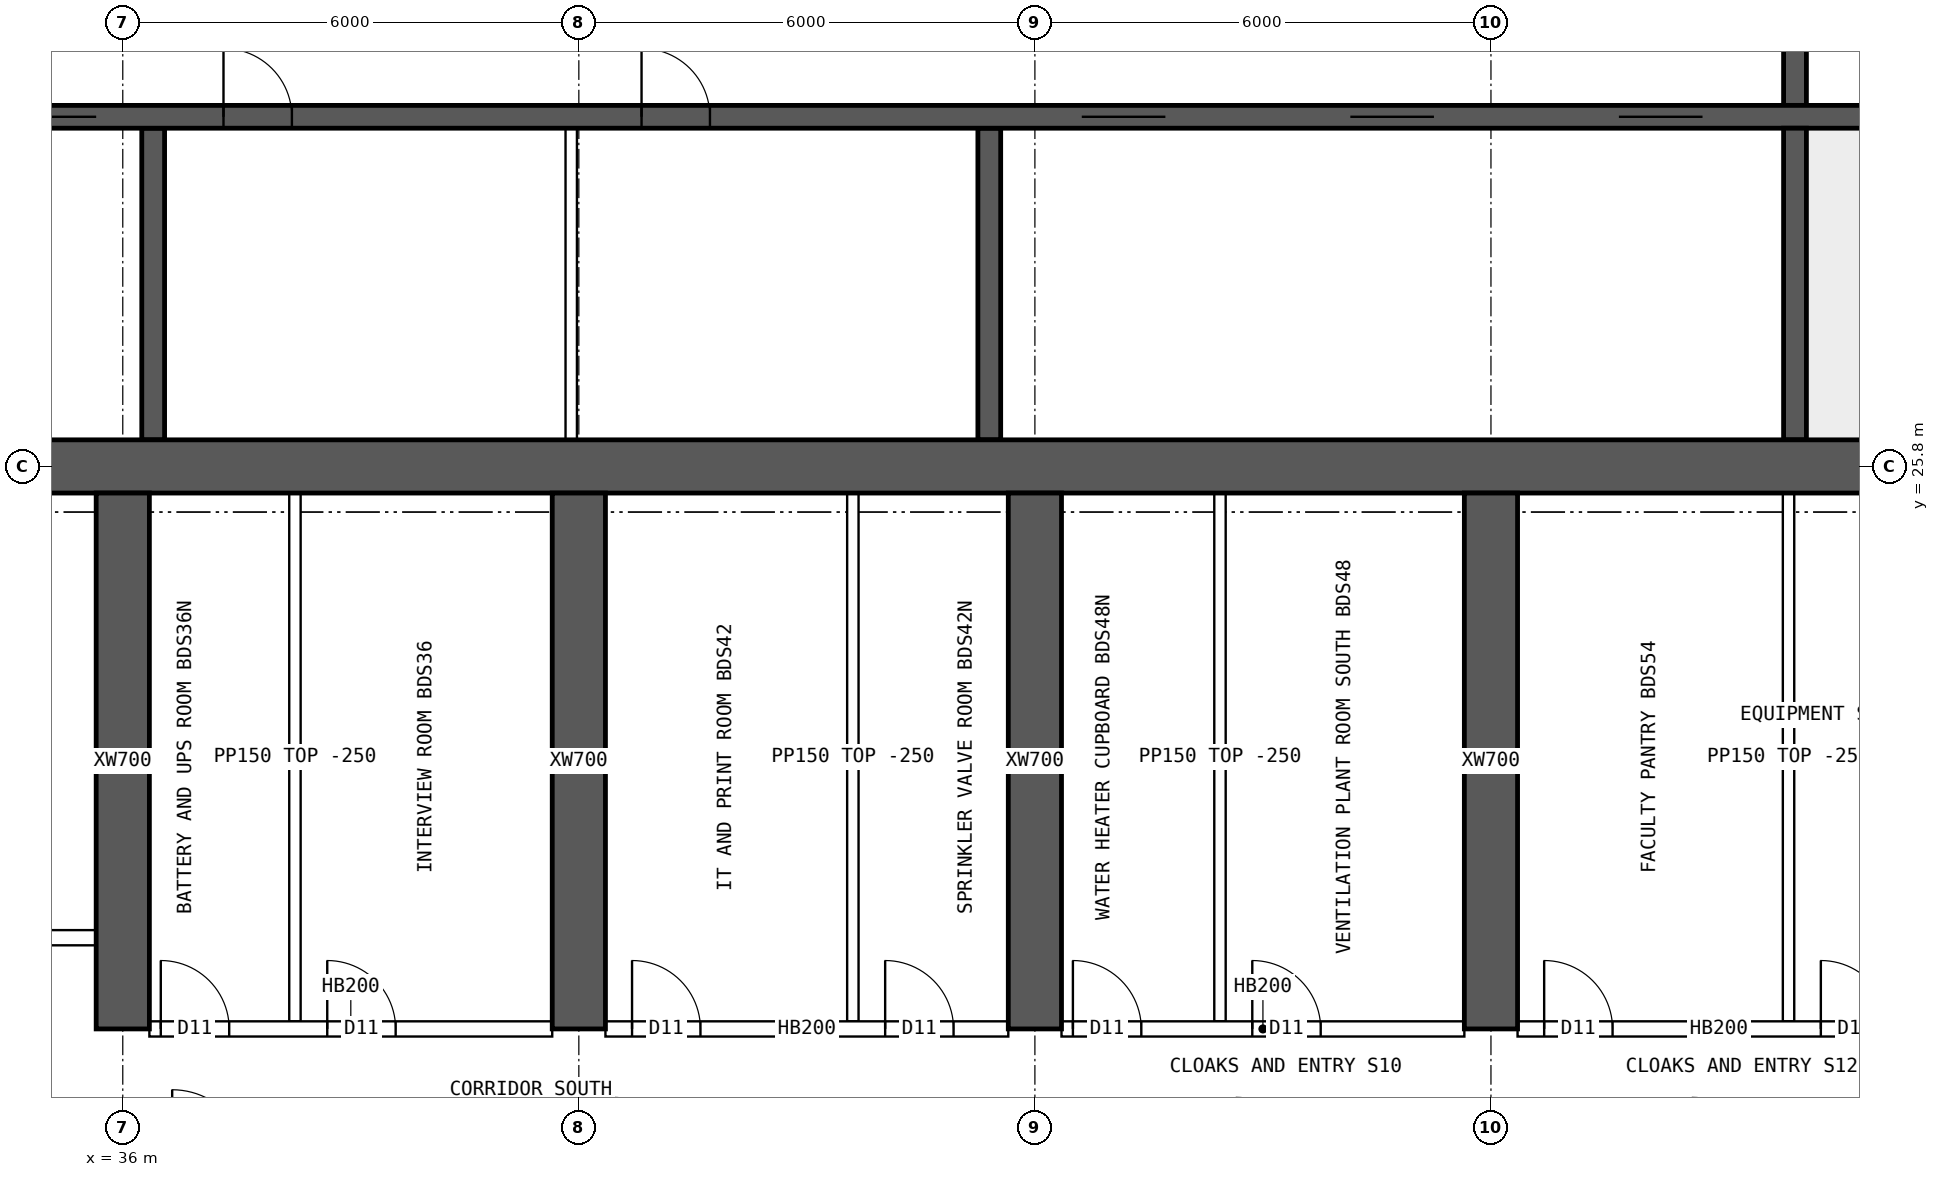
"""IFC4 building model, lengths in metres.
Left out: names, types, materials, properties, quantities, classifications, styles, units other than length and angle.
Written with IfcOpenShell. Run it as: python <this file> out.ifc"""

import sys

from ifc_helpers import new_model, si_unit, direction, frame, frame_2d, origin, place, context, subcontext, project, spatial, rectangle, extrude, element, fill, save


model = new_model("IFC4")
c1 = context("Model", 3, precision=1e-05, world=origin(), true_north=direction((0.0, 1.0)))
c2 = subcontext(c1, "Body", "Model", "MODEL_VIEW")
j1 = project(units=[si_unit("LENGTHUNIT", "METRE"), si_unit("PLANEANGLEUNIT", "RADIAN")], contexts=[c1])
p1 = place(None, origin())
s1 = spatial("IfcSite", under=j1, at=p1, CompositionType="ELEMENT")
p2 = place(p1, origin())
s2 = spatial("IfcBuilding", under=s1, at=p2, CompositionType="ELEMENT")
p3 = place(p2, frame((0.0, 0.0, 250.3)))
s3 = spatial("IfcBuildingStorey", under=s2, at=p3, CompositionType="ELEMENT", Elevation=250.3)
p4 = place(p3, frame((18.0, 25.8, 0.0), z_axis=(0.0, 0.0, 1.0), x_axis=(1.0, 0.0, 0.0)))
e1 = element("IfcWall", 1, at=p4, inside=s3, PredefinedType="SHEAR", context=c2, shape_type="SweptSolid", body=[
    extrude(rectangle(XDim=48.0, YDim=0.7, at=frame_2d((24.0, 0.0))), origin(), (0.0, 0.0, 1.0), 3.75),
])
p5 = place(p3, frame((18.35, 30.4, 0.0), z_axis=(0.0, 0.0, 1.0), x_axis=(1.0, 0.0, 0.0)))
e2 = element("IfcWall", 2, at=p5, inside=s3, PredefinedType="SHEAR", context=c2, shape_type="SweptSolid", body=[
    extrude(rectangle(XDim=47.3, YDim=0.3, at=frame_2d((23.65, 0.0))), origin(), (0.0, 0.0, 1.0), 3.75),
])
p6 = place(p5, frame((0.4, 0.0, 0.0)))
e3 = element("IfcOpeningElement", 3, at=p6, cuts=e2, PredefinedType="OPENING", context=c2, shape_type="SweptSolid", body=[
    extrude(rectangle(XDim=1.0, YDim=2.1, at=frame_2d((0.5, 1.05))), frame((0.0, 0.16, 0.0), z_axis=(0.0, -1.0, 0.0), x_axis=(1.0, 0.0, 0.0)), (0.0, 0.0, 1.0), 0.32),
])
p7 = place(p5, frame((45.9, 0.0, 0.0)))
e4 = element("IfcOpeningElement", 4, at=p7, cuts=e2, PredefinedType="OPENING", context=c2, shape_type="SweptSolid", body=[
    extrude(rectangle(XDim=1.0, YDim=2.1, at=frame_2d((0.5, 1.05))), frame((0.0, 0.16, 0.0), z_axis=(0.0, -1.0, 0.0), x_axis=(1.0, 0.0, 0.0)), (0.0, 0.0, 1.0), 0.32),
])
p8 = place(p5, frame((8.4, 0.0, 0.0)))
e5 = element("IfcOpeningElement", 5, at=p8, cuts=e2, PredefinedType="OPENING", context=c2, shape_type="SweptSolid", body=[
    extrude(rectangle(XDim=1.1, YDim=2.1, at=frame_2d((0.55, 1.05))), frame((0.0, 0.16, 0.0), z_axis=(0.0, -1.0, 0.0), x_axis=(1.0, 0.0, 0.0)), (0.0, 0.0, 1.0), 0.32),
])
p9 = place(p5, frame((11.0, 0.0, 0.0)))
e6 = element("IfcOpeningElement", 6, at=p9, cuts=e2, PredefinedType="OPENING", context=c2, shape_type="SweptSolid", body=[
    extrude(rectangle(XDim=1.1, YDim=2.1, at=frame_2d((0.55, 1.05))), frame((0.0, 0.16, 0.0), z_axis=(0.0, -1.0, 0.0), x_axis=(1.0, 0.0, 0.0)), (0.0, 0.0, 1.0), 0.32),
])
p10 = place(p5, frame((13.6, 0.0, 0.0)))
e7 = element("IfcOpeningElement", 7, at=p10, cuts=e2, PredefinedType="OPENING", context=c2, shape_type="SweptSolid", body=[
    extrude(rectangle(XDim=1.1, YDim=2.1, at=frame_2d((0.55, 1.05))), frame((0.0, 0.16, 0.0), z_axis=(0.0, -1.0, 0.0), x_axis=(1.0, 0.0, 0.0)), (0.0, 0.0, 1.0), 0.32),
])
p11 = place(p5, frame((16.2, 0.0, 0.0)))
e8 = element("IfcOpeningElement", 8, at=p11, cuts=e2, PredefinedType="OPENING", context=c2, shape_type="SweptSolid", body=[
    extrude(rectangle(XDim=1.1, YDim=2.1, at=frame_2d((0.55, 1.05))), frame((0.0, 0.16, 0.0), z_axis=(0.0, -1.0, 0.0), x_axis=(1.0, 0.0, 0.0)), (0.0, 0.0, 1.0), 0.32),
])
p12 = place(p5, frame((18.975, 0.0, 0.0)))
e9 = element("IfcOpeningElement", 9, at=p12, cuts=e2, PredefinedType="OPENING", context=c2, shape_type="SweptSolid", body=[
    extrude(rectangle(XDim=0.9, YDim=2.1, at=frame_2d((0.45, 1.05))), frame((0.0, 0.16, 0.0), z_axis=(0.0, -1.0, 0.0), x_axis=(1.0, 0.0, 0.0)), (0.0, 0.0, 1.0), 0.32),
])
p13 = place(p5, frame((24.475, 0.0, 0.0)))
e10 = element("IfcOpeningElement", 10, at=p13, cuts=e2, PredefinedType="OPENING", context=c2, shape_type="SweptSolid", body=[
    extrude(rectangle(XDim=0.9, YDim=2.1, at=frame_2d((0.45, 1.05))), frame((0.0, 0.16, 0.0), z_axis=(0.0, -1.0, 0.0), x_axis=(1.0, 0.0, 0.0)), (0.0, 0.0, 1.0), 0.32),
])
p14 = place(p5, frame((30.267, 0.0, 0.0)))
e11 = element("IfcOpeningElement", 11, at=p14, cuts=e2, PredefinedType="OPENING", context=c2, shape_type="SweptSolid", body=[
    extrude(rectangle(XDim=1.1, YDim=2.1, at=frame_2d((0.55, 1.05))), frame((0.0, 0.16, 0.0), z_axis=(0.0, -1.0, 0.0), x_axis=(1.0, 0.0, 0.0)), (0.0, 0.0, 1.0), 0.32),
])
p15 = place(p5, frame((33.8, 0.0, 0.0)))
e12 = element("IfcOpeningElement", 12, at=p15, cuts=e2, PredefinedType="OPENING", context=c2, shape_type="SweptSolid", body=[
    extrude(rectangle(XDim=1.1, YDim=2.1, at=frame_2d((0.55, 1.05))), frame((0.0, 0.16, 0.0), z_axis=(0.0, -1.0, 0.0), x_axis=(1.0, 0.0, 0.0)), (0.0, 0.0, 1.0), 0.32),
])
p16 = place(p5, frame((37.333, 0.0, 0.0)))
e13 = element("IfcOpeningElement", 13, at=p16, cuts=e2, PredefinedType="OPENING", context=c2, shape_type="SweptSolid", body=[
    extrude(rectangle(XDim=1.1, YDim=2.1, at=frame_2d((0.55, 1.05))), frame((0.0, 0.16, 0.0), z_axis=(0.0, -1.0, 0.0), x_axis=(1.0, 0.0, 0.0)), (0.0, 0.0, 1.0), 0.32),
])
p17 = place(p3, frame((58.0, 26.15, 0.0), z_axis=(0.0, 0.0, 1.0), x_axis=(0.0, 1.0, 0.0)))
e14 = element("IfcWall", 14, at=p17, inside=s3, PredefinedType="SHEAR", context=c2, shape_type="SweptSolid", body=[
    extrude(rectangle(XDim=4.1, YDim=0.3, at=frame_2d((2.05, 0.0))), origin(), (0.0, 0.0, 1.0), 3.75),
])
p18 = place(p3, frame((58.0, 30.55, 0.0), z_axis=(0.0, 0.0, 1.0), x_axis=(0.0, 1.0, 0.0)))
e15 = element("IfcWall", 15, at=p18, inside=s3, PredefinedType="SHEAR", context=c2, shape_type="SweptSolid", body=[
    extrude(rectangle(XDim=3.9, YDim=0.3, at=frame_2d((1.95, 0.0))), origin(), (0.0, 0.0, 1.0), 3.75),
])
p19 = place(p18, frame((1.4, 0.0, 0.0)))
e16 = element("IfcOpeningElement", 16, at=p19, cuts=e15, PredefinedType="OPENING", context=c2, shape_type="SweptSolid", body=[
    extrude(rectangle(XDim=1.2, YDim=2.1, at=frame_2d((0.6, 1.05))), frame((0.0, 0.16, 0.0), z_axis=(0.0, -1.0, 0.0), x_axis=(1.0, 0.0, 0.0)), (0.0, 0.0, 1.0), 0.32),
])
for number, where, z_axis, x_axis in (
    (17, (36.4, 26.15, 0.0), (0.0, 0.0, 1.0), (0.0, 1.0, 0.0)),
    (18, (47.4, 26.15, 0.0), (0.0, 0.0, 1.0), (0.0, 1.0, 0.0)),
):
    element("IfcWall", number, at=place(p3, frame(where, z_axis=z_axis, x_axis=x_axis)), inside=s3, PredefinedType="SHEAR", context=c2, shape_type="SweptSolid", body=[
        extrude(rectangle(XDim=4.1, YDim=0.3, at=frame_2d((2.05, 0.0))), origin(), (0.0, 0.0, 1.0), 3.75),
    ])
for number, where, z_axis, x_axis in (
    (19, (36.0, 18.4, 0.0), (0.0, 0.0, 1.0), (0.0, 1.0, 0.0)),
    (20, (42.0, 18.4, 0.0), (0.0, 0.0, 1.0), (0.0, 1.0, 0.0)),
    (21, (48.0, 18.4, 0.0), (0.0, 0.0, 1.0), (0.0, 1.0, 0.0)),
    (22, (54.0, 18.4, 0.0), (0.0, 0.0, 1.0), (0.0, 1.0, 0.0)),
):
    element("IfcWall", number, at=place(p3, frame(where, z_axis=z_axis, x_axis=x_axis)), inside=s3, PredefinedType="SHEAR", context=c2, shape_type="SweptSolid", body=[
        extrude(rectangle(XDim=7.05, YDim=0.7, at=frame_2d((3.525, 0.0))), origin(), (0.0, 0.0, 1.0), 3.75),
    ])
p20 = place(p3, frame((41.9, 26.15, 0.0), z_axis=(0.0, 0.0, 1.0), x_axis=(0.0, 1.0, 0.0)))
e23 = element("IfcWall", 23, at=p20, inside=s3, PredefinedType="SOLIDWALL", context=c2, shape_type="SweptSolid", body=[
    extrude(rectangle(XDim=4.1, YDim=0.15, at=frame_2d((2.05, 0.0))), origin(), (0.0, 0.0, 1.0), 3.5),
])
p21 = place(p3, frame((36.35, 18.4, 0.0), z_axis=(0.0, 0.0, 1.0), x_axis=(1.0, 0.0, 0.0)))
e24 = element("IfcWall", 24, at=p21, inside=s3, PredefinedType="SOLIDWALL", context=c2, shape_type="SweptSolid", body=[
    extrude(rectangle(XDim=5.3, YDim=0.2, at=frame_2d((2.65, 0.0))), origin(), (0.0, 0.0, 1.0), 3.5),
])
p22 = place(p21, frame((0.15, 0.0, 0.0)))
e25 = element("IfcOpeningElement", 25, at=p22, cuts=e24, PredefinedType="OPENING", context=c2, shape_type="SweptSolid", body=[
    extrude(rectangle(XDim=0.9, YDim=2.1, at=frame_2d((0.45, 1.05))), frame((0.0, 0.11, 0.0), z_axis=(0.0, -1.0, 0.0), x_axis=(1.0, 0.0, 0.0)), (0.0, 0.0, 1.0), 0.22),
])
p23 = place(p21, frame((2.34, 0.0, 0.0)))
e26 = element("IfcOpeningElement", 26, at=p23, cuts=e24, PredefinedType="OPENING", context=c2, shape_type="SweptSolid", body=[
    extrude(rectangle(XDim=0.9, YDim=2.1, at=frame_2d((0.45, 1.05))), frame((0.0, 0.11, 0.0), z_axis=(0.0, -1.0, 0.0), x_axis=(1.0, 0.0, 0.0)), (0.0, 0.0, 1.0), 0.22),
])
p24 = place(p3, frame((42.35, 18.4, 0.0), z_axis=(0.0, 0.0, 1.0), x_axis=(1.0, 0.0, 0.0)))
e27 = element("IfcWall", 27, at=p24, inside=s3, PredefinedType="SOLIDWALL", context=c2, shape_type="SweptSolid", body=[
    extrude(rectangle(XDim=5.3, YDim=0.2, at=frame_2d((2.65, 0.0))), origin(), (0.0, 0.0, 1.0), 3.5),
])
p25 = place(p24, frame((0.35, 0.0, 0.0)))
e28 = element("IfcOpeningElement", 28, at=p25, cuts=e27, PredefinedType="OPENING", context=c2, shape_type="SweptSolid", body=[
    extrude(rectangle(XDim=0.9, YDim=2.1, at=frame_2d((0.45, 1.05))), frame((0.0, 0.11, 0.0), z_axis=(0.0, -1.0, 0.0), x_axis=(1.0, 0.0, 0.0)), (0.0, 0.0, 1.0), 0.22),
])
p26 = place(p24, frame((3.68, 0.0, 0.0)))
e29 = element("IfcOpeningElement", 29, at=p26, cuts=e27, PredefinedType="OPENING", context=c2, shape_type="SweptSolid", body=[
    extrude(rectangle(XDim=0.9, YDim=2.1, at=frame_2d((0.45, 1.05))), frame((0.0, 0.11, 0.0), z_axis=(0.0, -1.0, 0.0), x_axis=(1.0, 0.0, 0.0)), (0.0, 0.0, 1.0), 0.22),
])
p27 = place(p3, frame((48.35, 18.4, 0.0), z_axis=(0.0, 0.0, 1.0), x_axis=(1.0, 0.0, 0.0)))
e30 = element("IfcWall", 30, at=p27, inside=s3, PredefinedType="SOLIDWALL", context=c2, shape_type="SweptSolid", body=[
    extrude(rectangle(XDim=5.3, YDim=0.2, at=frame_2d((2.65, 0.0))), origin(), (0.0, 0.0, 1.0), 3.5),
])
p28 = place(p27, frame((0.15, 0.0, 0.0)))
e31 = element("IfcOpeningElement", 31, at=p28, cuts=e30, PredefinedType="OPENING", context=c2, shape_type="SweptSolid", body=[
    extrude(rectangle(XDim=0.9, YDim=2.1, at=frame_2d((0.45, 1.05))), frame((0.0, 0.11, 0.0), z_axis=(0.0, -1.0, 0.0), x_axis=(1.0, 0.0, 0.0)), (0.0, 0.0, 1.0), 0.22),
])
p29 = place(p27, frame((2.51, 0.0, 0.0)))
e32 = element("IfcOpeningElement", 32, at=p29, cuts=e30, PredefinedType="OPENING", context=c2, shape_type="SweptSolid", body=[
    extrude(rectangle(XDim=0.9, YDim=2.1, at=frame_2d((0.45, 1.05))), frame((0.0, 0.11, 0.0), z_axis=(0.0, -1.0, 0.0), x_axis=(1.0, 0.0, 0.0)), (0.0, 0.0, 1.0), 0.22),
])
p30 = place(p3, frame((54.35, 18.4, 0.0), z_axis=(0.0, 0.0, 1.0), x_axis=(1.0, 0.0, 0.0)))
e33 = element("IfcWall", 33, at=p30, inside=s3, PredefinedType="SOLIDWALL", context=c2, shape_type="SweptSolid", body=[
    extrude(rectangle(XDim=5.3, YDim=0.2, at=frame_2d((2.65, 0.0))), origin(), (0.0, 0.0, 1.0), 3.5),
])
p31 = place(p30, frame((0.35, 0.0, 0.0)))
e34 = element("IfcOpeningElement", 34, at=p31, cuts=e33, PredefinedType="OPENING", context=c2, shape_type="SweptSolid", body=[
    extrude(rectangle(XDim=0.9, YDim=2.1, at=frame_2d((0.45, 1.05))), frame((0.0, 0.11, 0.0), z_axis=(0.0, -1.0, 0.0), x_axis=(1.0, 0.0, 0.0)), (0.0, 0.0, 1.0), 0.22),
])
p32 = place(p30, frame((3.99, 0.0, 0.0)))
e35 = element("IfcOpeningElement", 35, at=p32, cuts=e33, PredefinedType="OPENING", context=c2, shape_type="SweptSolid", body=[
    extrude(rectangle(XDim=0.9, YDim=2.1, at=frame_2d((0.45, 1.05))), frame((0.0, 0.11, 0.0), z_axis=(0.0, -1.0, 0.0), x_axis=(1.0, 0.0, 0.0)), (0.0, 0.0, 1.0), 0.22),
])
p33 = place(p3, frame((30.35, 19.6, 0.0), z_axis=(0.0, 0.0, 1.0), x_axis=(1.0, 0.0, 0.0)))
e36 = element("IfcWall", 36, at=p33, inside=s3, PredefinedType="SOLIDWALL", context=c2, shape_type="SweptSolid", body=[
    extrude(rectangle(XDim=5.3, YDim=0.2, at=frame_2d((2.65, 0.0))), origin(), (0.0, 0.0, 1.0), 3.5),
])
p34 = place(p33, frame((0.8, 0.0, 0.0)))
e37 = element("IfcOpeningElement", 37, at=p34, cuts=e36, PredefinedType="OPENING", context=c2, shape_type="SweptSolid", body=[
    extrude(rectangle(XDim=1.0, YDim=2.1, at=frame_2d((0.5, 1.05))), frame((0.0, 0.11, 0.0), z_axis=(0.0, -1.0, 0.0), x_axis=(1.0, 0.0, 0.0)), (0.0, 0.0, 1.0), 0.22),
])
for number, where, z_axis, x_axis in (
    (38, (38.265, 18.5, 0.0), (0.0, 0.0, 1.0), (0.0, 1.0, 0.0)),
    (39, (45.605, 18.5, 0.0), (0.0, 0.0, 1.0), (0.0, 1.0, 0.0)),
    (40, (50.435, 18.5, 0.0), (0.0, 0.0, 1.0), (0.0, 1.0, 0.0)),
    (41, (57.915, 18.5, 0.0), (0.0, 0.0, 1.0), (0.0, 1.0, 0.0)),
):
    element("IfcWall", number, at=place(p3, frame(where, z_axis=z_axis, x_axis=x_axis)), inside=s3, PredefinedType="PARTITIONING", context=c2, shape_type="SweptSolid", body=[
        extrude(rectangle(XDim=6.95, YDim=0.15, at=frame_2d((3.475, 0.0))), origin(), (0.0, 0.0, 1.0), 3.5),
    ])
p35 = place(p11, origin())
e42 = element("IfcDoor", 42, at=p35, inside=s3, OperationType="DOUBLE_DOOR_SLIDING", PredefinedType="DOOR", context=c2, shape_type="SweptSolid", body=[
    extrude(rectangle(XDim=1.1, YDim=2.1, at=frame_2d((0.55, 1.05))), frame((0.0, 0.025, 0.0), z_axis=(0.0, -1.0, 0.0), x_axis=(1.0, 0.0, 0.0)), (0.0, 0.0, 1.0), 0.05),
])
fill(e8, e42)
p36 = place(p12, origin())
e43 = element("IfcDoor", 43, at=p36, inside=s3, OperationType="SINGLE_SWING_LEFT", PredefinedType="DOOR", context=c2, shape_type="SweptSolid", body=[
    extrude(rectangle(XDim=0.9, YDim=2.1, at=frame_2d((0.45, 1.05))), frame((0.0, 0.025, 0.0), z_axis=(0.0, -1.0, 0.0), x_axis=(1.0, 0.0, 0.0)), (0.0, 0.0, 1.0), 0.05),
])
fill(e9, e43)
p37 = place(p13, origin())
e44 = element("IfcDoor", 44, at=p37, inside=s3, OperationType="SINGLE_SWING_LEFT", PredefinedType="DOOR", context=c2, shape_type="SweptSolid", body=[
    extrude(rectangle(XDim=0.9, YDim=2.1, at=frame_2d((0.45, 1.05))), frame((0.0, 0.025, 0.0), z_axis=(0.0, -1.0, 0.0), x_axis=(1.0, 0.0, 0.0)), (0.0, 0.0, 1.0), 0.05),
])
fill(e10, e44)
p38 = place(p14, origin())
e45 = element("IfcDoor", 45, at=p38, inside=s3, OperationType="DOUBLE_DOOR_SLIDING", PredefinedType="DOOR", context=c2, shape_type="SweptSolid", body=[
    extrude(rectangle(XDim=1.1, YDim=2.1, at=frame_2d((0.55, 1.05))), frame((0.0, 0.025, 0.0), z_axis=(0.0, -1.0, 0.0), x_axis=(1.0, 0.0, 0.0)), (0.0, 0.0, 1.0), 0.05),
])
fill(e11, e45)
p39 = place(p15, origin())
e46 = element("IfcDoor", 46, at=p39, inside=s3, OperationType="DOUBLE_DOOR_SLIDING", PredefinedType="DOOR", context=c2, shape_type="SweptSolid", body=[
    extrude(rectangle(XDim=1.1, YDim=2.1, at=frame_2d((0.55, 1.05))), frame((0.0, 0.025, 0.0), z_axis=(0.0, -1.0, 0.0), x_axis=(1.0, 0.0, 0.0)), (0.0, 0.0, 1.0), 0.05),
])
fill(e12, e46)
p40 = place(p16, origin())
e47 = element("IfcDoor", 47, at=p40, inside=s3, OperationType="DOUBLE_DOOR_SLIDING", PredefinedType="DOOR", context=c2, shape_type="SweptSolid", body=[
    extrude(rectangle(XDim=1.1, YDim=2.1, at=frame_2d((0.55, 1.05))), frame((0.0, 0.025, 0.0), z_axis=(0.0, -1.0, 0.0), x_axis=(1.0, 0.0, 0.0)), (0.0, 0.0, 1.0), 0.05),
])
fill(e13, e47)
p41 = place(p22, origin())
e48 = element("IfcDoor", 48, at=p41, inside=s3, OperationType="SINGLE_SWING_LEFT", PredefinedType="DOOR", context=c2, shape_type="SweptSolid", body=[
    extrude(rectangle(XDim=0.9, YDim=2.1, at=frame_2d((0.45, 1.05))), frame((0.0, 0.025, 0.0), z_axis=(0.0, -1.0, 0.0), x_axis=(1.0, 0.0, 0.0)), (0.0, 0.0, 1.0), 0.05),
])
fill(e25, e48)
p42 = place(p23, origin())
e49 = element("IfcDoor", 49, at=p42, inside=s3, OperationType="SINGLE_SWING_LEFT", PredefinedType="DOOR", context=c2, shape_type="SweptSolid", body=[
    extrude(rectangle(XDim=0.9, YDim=2.1, at=frame_2d((0.45, 1.05))), frame((0.0, 0.025, 0.0), z_axis=(0.0, -1.0, 0.0), x_axis=(1.0, 0.0, 0.0)), (0.0, 0.0, 1.0), 0.05),
])
fill(e26, e49)
p43 = place(p25, origin())
e50 = element("IfcDoor", 50, at=p43, inside=s3, OperationType="SINGLE_SWING_LEFT", PredefinedType="DOOR", context=c2, shape_type="SweptSolid", body=[
    extrude(rectangle(XDim=0.9, YDim=2.1, at=frame_2d((0.45, 1.05))), frame((0.0, 0.025, 0.0), z_axis=(0.0, -1.0, 0.0), x_axis=(1.0, 0.0, 0.0)), (0.0, 0.0, 1.0), 0.05),
])
fill(e28, e50)
p44 = place(p26, origin())
e51 = element("IfcDoor", 51, at=p44, inside=s3, OperationType="SINGLE_SWING_LEFT", PredefinedType="DOOR", context=c2, shape_type="SweptSolid", body=[
    extrude(rectangle(XDim=0.9, YDim=2.1, at=frame_2d((0.45, 1.05))), frame((0.0, 0.025, 0.0), z_axis=(0.0, -1.0, 0.0), x_axis=(1.0, 0.0, 0.0)), (0.0, 0.0, 1.0), 0.05),
])
fill(e29, e51)
p45 = place(p28, origin())
e52 = element("IfcDoor", 52, at=p45, inside=s3, OperationType="SINGLE_SWING_LEFT", PredefinedType="DOOR", context=c2, shape_type="SweptSolid", body=[
    extrude(rectangle(XDim=0.9, YDim=2.1, at=frame_2d((0.45, 1.05))), frame((0.0, 0.025, 0.0), z_axis=(0.0, -1.0, 0.0), x_axis=(1.0, 0.0, 0.0)), (0.0, 0.0, 1.0), 0.05),
])
fill(e31, e52)
p46 = place(p29, origin())
e53 = element("IfcDoor", 53, at=p46, inside=s3, OperationType="SINGLE_SWING_LEFT", PredefinedType="DOOR", context=c2, shape_type="SweptSolid", body=[
    extrude(rectangle(XDim=0.9, YDim=2.1, at=frame_2d((0.45, 1.05))), frame((0.0, 0.025, 0.0), z_axis=(0.0, -1.0, 0.0), x_axis=(1.0, 0.0, 0.0)), (0.0, 0.0, 1.0), 0.05),
])
fill(e32, e53)
p47 = place(p31, origin())
e54 = element("IfcDoor", 54, at=p47, inside=s3, OperationType="SINGLE_SWING_LEFT", PredefinedType="DOOR", context=c2, shape_type="SweptSolid", body=[
    extrude(rectangle(XDim=0.9, YDim=2.1, at=frame_2d((0.45, 1.05))), frame((0.0, 0.025, 0.0), z_axis=(0.0, -1.0, 0.0), x_axis=(1.0, 0.0, 0.0)), (0.0, 0.0, 1.0), 0.05),
])
fill(e34, e54)
p48 = place(p32, origin())
e55 = element("IfcDoor", 55, at=p48, inside=s3, OperationType="SINGLE_SWING_LEFT", PredefinedType="DOOR", context=c2, shape_type="SweptSolid", body=[
    extrude(rectangle(XDim=0.9, YDim=2.1, at=frame_2d((0.45, 1.05))), frame((0.0, 0.025, 0.0), z_axis=(0.0, -1.0, 0.0), x_axis=(1.0, 0.0, 0.0)), (0.0, 0.0, 1.0), 0.05),
])
fill(e35, e55)
save(model, sys.argv[1])
